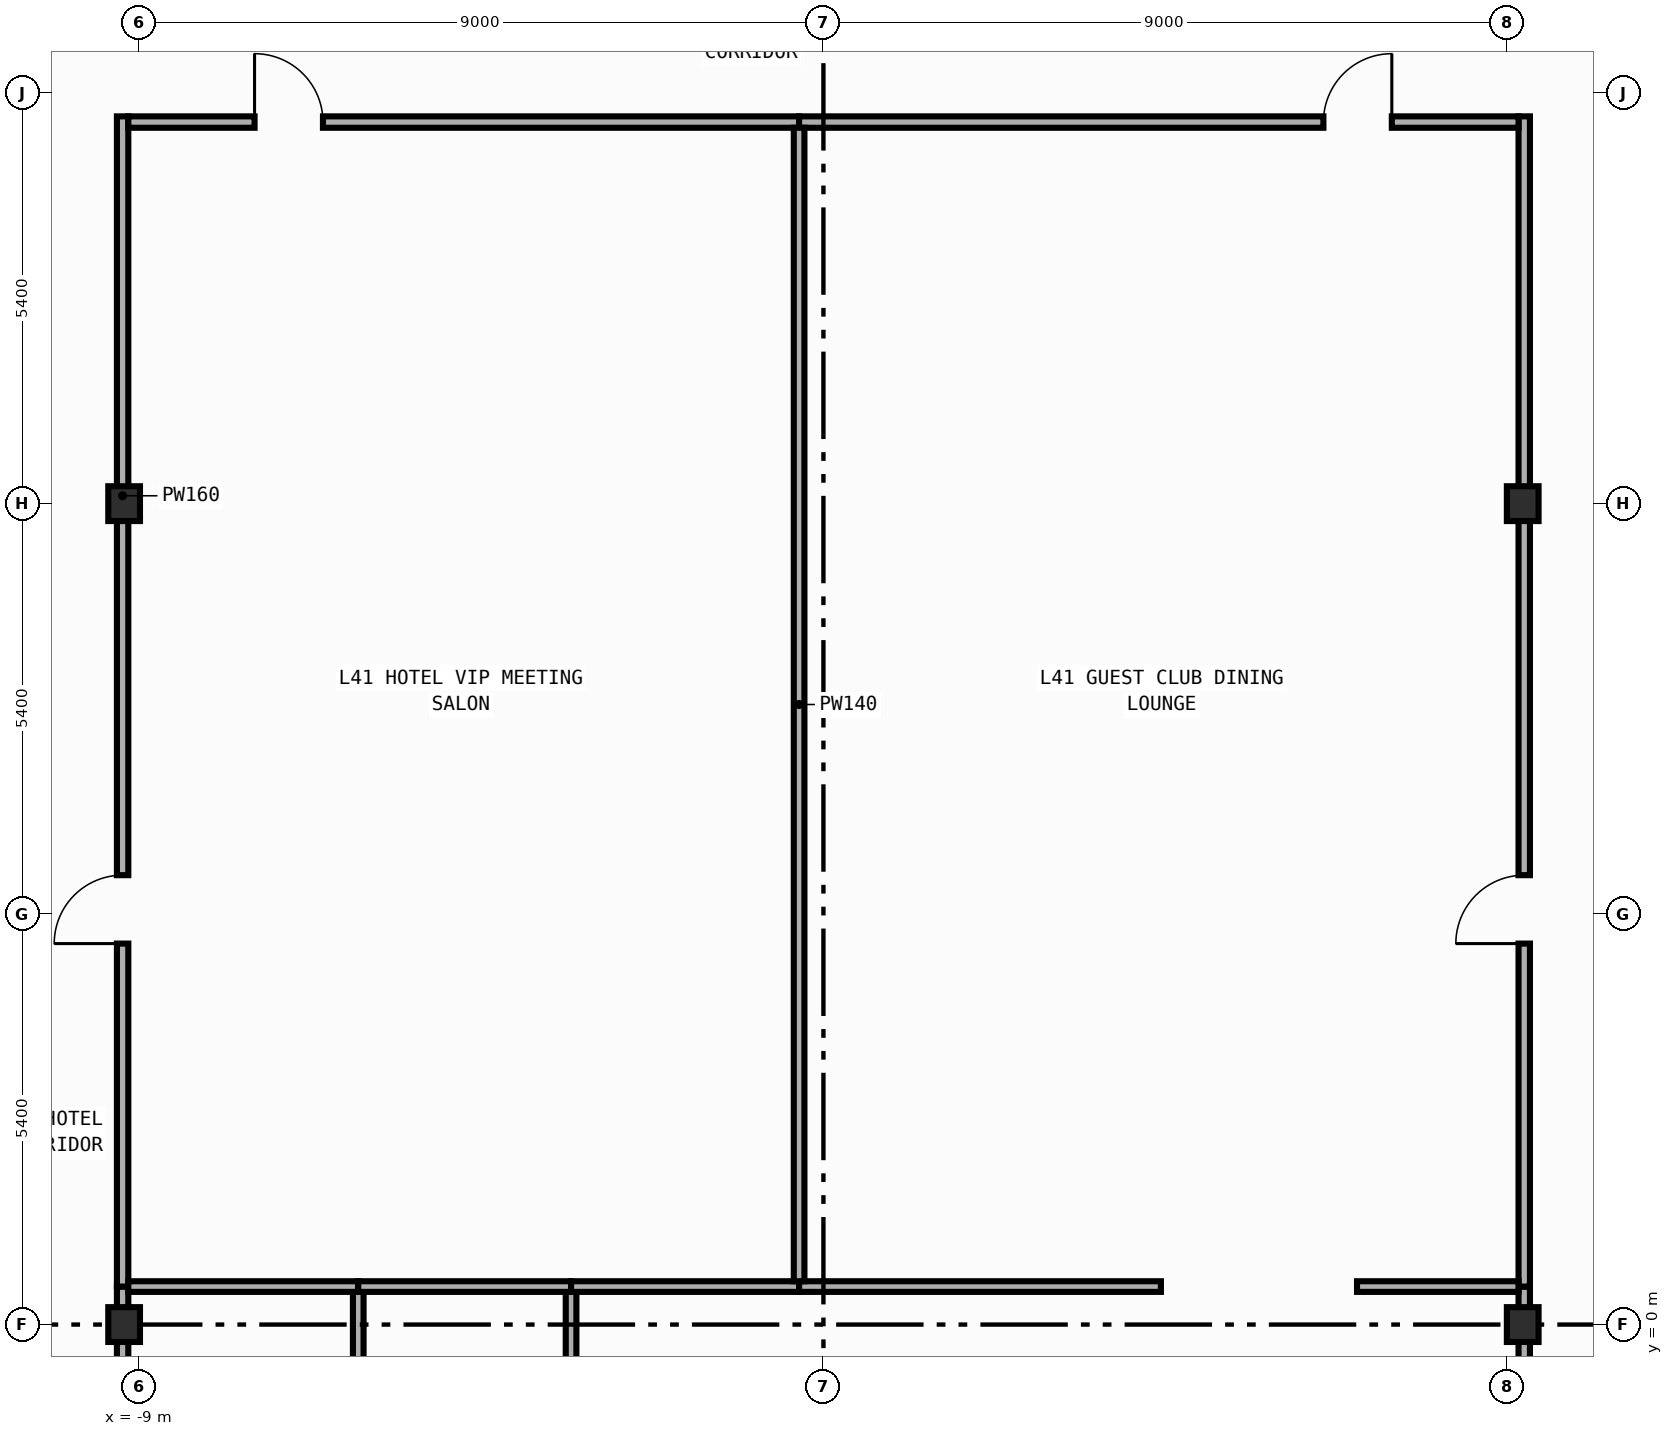
"""IFC4 building model, lengths in metres.
Left out: names, types, materials, properties, quantities, classifications, styles, units other than length and angle.
Written with IfcOpenShell. Run it as: python <this file> out.ifc"""

import sys

from ifc_helpers import new_model, si_unit, direction, frame, frame_2d, origin, origin_2d, place, context, subcontext, project, spatial, rectangle, i_section, extrude, element, fill, save


model = new_model("IFC4")
c1 = context("Model", 3, precision=1e-05, world=origin(), true_north=direction((0.0, 1.0)))
c2 = subcontext(c1, "Body", "Model", "MODEL_VIEW")
j1 = project(units=[si_unit("LENGTHUNIT", "METRE"), si_unit("PLANEANGLEUNIT", "RADIAN")], contexts=[c1])
p1 = place(None, origin())
s1 = spatial("IfcSite", under=j1, at=p1, CompositionType="ELEMENT")
p2 = place(p1, origin())
s2 = spatial("IfcBuilding", under=s1, at=p2, CompositionType="ELEMENT")
p3 = place(p2, frame((0.0, 0.0, 180.2)))
s3 = spatial("IfcBuildingStorey", under=s2, at=p3, CompositionType="ELEMENT", Elevation=180.2)
for number, where, z_axis, x_axis in (
    (1, (-9.2, 0.0, 0.0), (0.0, 0.0, 1.0), (1.0, 0.0, 0.0)),
    (2, (-9.2, 10.8, 0.0), (0.0, 0.0, 1.0), (1.0, 0.0, 0.0)),
    (3, (9.2, 0.0, 0.0), (0.0, 0.0, 1.0), (1.0, 0.0, 0.0)),
    (4, (9.2, 10.8, 0.0), (0.0, 0.0, 1.0), (1.0, 0.0, 0.0)),
):
    element("IfcColumn", number, at=place(p3, frame(where, z_axis=z_axis, x_axis=x_axis)), inside=s3, PredefinedType="COLUMN", context=c2, shape_type="SweptSolid", body=[
        extrude(i_section(OverallWidth=0.417, OverallDepth=0.458, WebThickness=0.03, FlangeThickness=0.05, FilletRadius=0.022, at=origin_2d()), origin(), (0.0, 0.0, 1.0), 3.8),
    ])
p4 = place(p3, frame((-9.22, -14.595, 0.0), z_axis=(0.0, 0.0, 1.0), x_axis=(0.0, 1.0, 0.0)))
e5 = element("IfcWall", 5, at=p4, inside=s3, PredefinedType="PARTITIONING", context=c2, shape_type="SweptSolid", body=[
    extrude(rectangle(XDim=15.095, YDim=0.15, at=frame_2d((7.547, 0.0))), origin(), (0.0, 0.0, 1.0), 2.952),
])
p5 = place(p4, frame((8.707, 0.0, 0.0)))
e6 = element("IfcOpeningElement", 6, at=p5, cuts=e5, PredefinedType="OPENING", context=c2, shape_type="SweptSolid", body=[
    extrude(rectangle(XDim=0.9, YDim=2.15, at=frame_2d((0.45, 1.075))), frame((0.0, 0.085, 0.0), z_axis=(0.0, -1.0, 0.0), x_axis=(1.0, 0.0, 0.0)), (0.0, 0.0, 1.0), 0.17),
])
p6 = place(p3, frame((-9.22, 0.5, 0.0), z_axis=(0.0, 0.0, 1.0), x_axis=(0.0, 1.0, 0.0)))
e7 = element("IfcWall", 7, at=p6, inside=s3, PredefinedType="PARTITIONING", context=c2, shape_type="SweptSolid", body=[
    extrude(rectangle(XDim=15.395, YDim=0.15, at=frame_2d((7.698, 0.0))), origin(), (0.0, 0.0, 1.0), 2.952),
])
p7 = place(p6, frame((4.512, 0.0, 0.0)))
e8 = element("IfcOpeningElement", 8, at=p7, cuts=e7, PredefinedType="OPENING", context=c2, shape_type="SweptSolid", body=[
    extrude(rectangle(XDim=0.9, YDim=2.15, at=frame_2d((0.45, 1.075))), frame((0.0, 0.085, 0.0), z_axis=(0.0, -1.0, 0.0), x_axis=(1.0, 0.0, 0.0)), (0.0, 0.0, 1.0), 0.17),
])
p8 = place(p3, frame((9.22, -14.595, 0.0), z_axis=(0.0, 0.0, 1.0), x_axis=(0.0, 1.0, 0.0)))
e9 = element("IfcWall", 9, at=p8, inside=s3, PredefinedType="PARTITIONING", context=c2, shape_type="SweptSolid", body=[
    extrude(rectangle(XDim=15.095, YDim=0.15, at=frame_2d((7.547, 0.0))), origin(), (0.0, 0.0, 1.0), 2.952),
])
p9 = place(p8, frame((8.707, 0.0, 0.0)))
e10 = element("IfcOpeningElement", 10, at=p9, cuts=e9, PredefinedType="OPENING", context=c2, shape_type="SweptSolid", body=[
    extrude(rectangle(XDim=0.9, YDim=2.15, at=frame_2d((0.45, 1.075))), frame((0.0, 0.085, 0.0), z_axis=(0.0, -1.0, 0.0), x_axis=(1.0, 0.0, 0.0)), (0.0, 0.0, 1.0), 0.17),
])
p10 = place(p3, frame((9.22, 0.5, 0.0), z_axis=(0.0, 0.0, 1.0), x_axis=(0.0, 1.0, 0.0)))
e11 = element("IfcWall", 11, at=p10, inside=s3, PredefinedType="PARTITIONING", context=c2, shape_type="SweptSolid", body=[
    extrude(rectangle(XDim=15.395, YDim=0.15, at=frame_2d((7.698, 0.0))), origin(), (0.0, 0.0, 1.0), 2.952),
])
p11 = place(p10, frame((4.512, 0.0, 0.0)))
e12 = element("IfcOpeningElement", 12, at=p11, cuts=e11, PredefinedType="OPENING", context=c2, shape_type="SweptSolid", body=[
    extrude(rectangle(XDim=0.9, YDim=2.15, at=frame_2d((0.45, 1.075))), frame((0.0, 0.085, 0.0), z_axis=(0.0, -1.0, 0.0), x_axis=(1.0, 0.0, 0.0)), (0.0, 0.0, 1.0), 0.17),
])
p12 = place(p3, frame((-9.145, 15.82, 0.0), z_axis=(0.0, 0.0, 1.0), x_axis=(1.0, 0.0, 0.0)))
e13 = element("IfcWall", 13, at=p12, inside=s3, PredefinedType="PARTITIONING", context=c2, shape_type="SweptSolid", body=[
    extrude(rectangle(XDim=8.825, YDim=0.15, at=frame_2d((4.413, 0.0))), origin(), (0.0, 0.0, 1.0), 3.54),
])
p13 = place(p12, frame((1.661, 0.0, 0.0)))
e14 = element("IfcOpeningElement", 14, at=p13, cuts=e13, PredefinedType="OPENING", context=c2, shape_type="SweptSolid", body=[
    extrude(rectangle(XDim=0.9, YDim=2.15, at=frame_2d((0.45, 1.075))), frame((0.0, 0.085, 0.0), z_axis=(0.0, -1.0, 0.0), x_axis=(1.0, 0.0, 0.0)), (0.0, 0.0, 1.0), 0.17),
])
p14 = place(p3, frame((-0.32, 15.82, 0.0), z_axis=(0.0, 0.0, 1.0), x_axis=(1.0, 0.0, 0.0)))
e15 = element("IfcWall", 15, at=p14, inside=s3, PredefinedType="PARTITIONING", context=c2, shape_type="SweptSolid", body=[
    extrude(rectangle(XDim=9.465, YDim=0.15, at=frame_2d((4.732, 0.0))), origin(), (0.0, 0.0, 1.0), 3.54),
])
p15 = place(p14, frame((6.898, 0.0, 0.0)))
e16 = element("IfcOpeningElement", 16, at=p15, cuts=e15, PredefinedType="OPENING", context=c2, shape_type="SweptSolid", body=[
    extrude(rectangle(XDim=0.9, YDim=2.15, at=frame_2d((0.45, 1.075))), frame((0.0, 0.085, 0.0), z_axis=(0.0, -1.0, 0.0), x_axis=(1.0, 0.0, 0.0)), (0.0, 0.0, 1.0), 0.17),
])
p16 = place(p3, frame((-6.12, -14.445, 0.0), z_axis=(0.0, 0.0, 1.0), x_axis=(0.0, 1.0, 0.0)))
e17 = element("IfcWall", 17, at=p16, inside=s3, PredefinedType="PARTITIONING", context=c2, shape_type="SweptSolid", body=[
    extrude(rectangle(XDim=14.875, YDim=0.14, at=frame_2d((7.438, 0.0))), origin(), (0.0, 0.0, 1.0), 3.54),
])
p17 = place(p3, frame((-9.145, 0.5, 0.0), z_axis=(0.0, 0.0, 1.0), x_axis=(1.0, 0.0, 0.0)))
e18 = element("IfcWall", 18, at=p17, inside=s3, PredefinedType="PARTITIONING", context=c2, shape_type="SweptSolid", body=[
    extrude(rectangle(XDim=3.025, YDim=0.14, at=frame_2d((1.512, 0.0))), origin(), (0.0, 0.0, 1.0), 3.54),
])
p18 = place(p3, frame((-3.32, -14.445, 0.0), z_axis=(0.0, 0.0, 1.0), x_axis=(0.0, 1.0, 0.0)))
e19 = element("IfcWall", 19, at=p18, inside=s3, PredefinedType="PARTITIONING", context=c2, shape_type="SweptSolid", body=[
    extrude(rectangle(XDim=14.875, YDim=0.14, at=frame_2d((7.438, 0.0))), origin(), (0.0, 0.0, 1.0), 3.54),
])
p19 = place(p3, frame((-6.12, 0.5, 0.0), z_axis=(0.0, 0.0, 1.0), x_axis=(1.0, 0.0, 0.0)))
e20 = element("IfcWall", 20, at=p19, inside=s3, PredefinedType="PARTITIONING", context=c2, shape_type="SweptSolid", body=[
    extrude(rectangle(XDim=2.8, YDim=0.14, at=frame_2d((1.4, 0.0))), origin(), (0.0, 0.0, 1.0), 3.54),
])
p20 = place(p3, frame((-3.32, 0.5, 0.0), z_axis=(0.0, 0.0, 1.0), x_axis=(1.0, 0.0, 0.0)))
e21 = element("IfcWall", 21, at=p20, inside=s3, PredefinedType="PARTITIONING", context=c2, shape_type="SweptSolid", body=[
    extrude(rectangle(XDim=3.0, YDim=0.14, at=frame_2d((1.5, 0.0))), origin(), (0.0, 0.0, 1.0), 3.54),
])
p21 = place(p3, frame((-0.32, 0.5, 0.0), z_axis=(0.0, 0.0, 1.0), x_axis=(1.0, 0.0, 0.0)))
e22 = element("IfcWall", 22, at=p21, inside=s3, PredefinedType="PARTITIONING", context=c2, shape_type="SweptSolid", body=[
    extrude(rectangle(XDim=4.76, YDim=0.14, at=frame_2d((2.38, 0.0))), origin(), (0.0, 0.0, 1.0), 3.54),
])
p22 = place(p3, frame((7.02, 0.5, 0.0), z_axis=(0.0, 0.0, 1.0), x_axis=(1.0, 0.0, 0.0)))
e23 = element("IfcWall", 23, at=p22, inside=s3, PredefinedType="PARTITIONING", context=c2, shape_type="SweptSolid", body=[
    extrude(rectangle(XDim=2.125, YDim=0.14, at=frame_2d((1.062, 0.0))), origin(), (0.0, 0.0, 1.0), 3.54),
])
p23 = place(p3, frame((-0.32, 0.57, 0.0), z_axis=(0.0, 0.0, 1.0), x_axis=(0.0, 1.0, 0.0)))
e24 = element("IfcWall", 24, at=p23, inside=s3, PredefinedType="PARTITIONING", context=c2, shape_type="SweptSolid", body=[
    extrude(rectangle(XDim=15.175, YDim=0.14, at=frame_2d((7.587, 0.0))), origin(), (0.0, 0.0, 1.0), 3.54),
])
p24 = place(p7, origin())
e25 = element("IfcDoor", 25, at=p24, inside=s3, OperationType="SINGLE_SWING_LEFT", PredefinedType="DOOR", context=c2, shape_type="SweptSolid", body=[
    extrude(rectangle(XDim=0.9, YDim=2.15, at=frame_2d((0.45, 1.075))), frame((0.0, 0.025, 0.0), z_axis=(0.0, -1.0, 0.0), x_axis=(1.0, 0.0, 0.0)), (0.0, 0.0, 1.0), 0.05),
])
fill(e8, e25)
p25 = place(p11, origin())
e26 = element("IfcDoor", 26, at=p25, inside=s3, OperationType="SINGLE_SWING_LEFT", PredefinedType="DOOR", context=c2, shape_type="SweptSolid", body=[
    extrude(rectangle(XDim=0.9, YDim=2.15, at=frame_2d((0.45, 1.075))), frame((0.0, 0.025, 0.0), z_axis=(0.0, -1.0, 0.0), x_axis=(1.0, 0.0, 0.0)), (0.0, 0.0, 1.0), 0.05),
])
fill(e12, e26)
p26 = place(p13, origin())
e27 = element("IfcDoor", 27, at=p26, inside=s3, OperationType="SINGLE_SWING_LEFT", PredefinedType="DOOR", context=c2, shape_type="SweptSolid", body=[
    extrude(rectangle(XDim=0.9, YDim=2.15, at=frame_2d((0.45, 1.075))), frame((0.0, 0.025, 0.0), z_axis=(0.0, -1.0, 0.0), x_axis=(1.0, 0.0, 0.0)), (0.0, 0.0, 1.0), 0.05),
])
fill(e14, e27)
p27 = place(p15, origin())
e28 = element("IfcDoor", 28, at=p27, inside=s3, OperationType="SINGLE_SWING_RIGHT", PredefinedType="DOOR", context=c2, shape_type="SweptSolid", body=[
    extrude(rectangle(XDim=0.9, YDim=2.15, at=frame_2d((0.45, 1.075))), frame((0.0, 0.025, 0.0), z_axis=(0.0, -1.0, 0.0), x_axis=(1.0, 0.0, 0.0)), (0.0, 0.0, 1.0), 0.05),
])
fill(e16, e28)
save(model, sys.argv[1])
